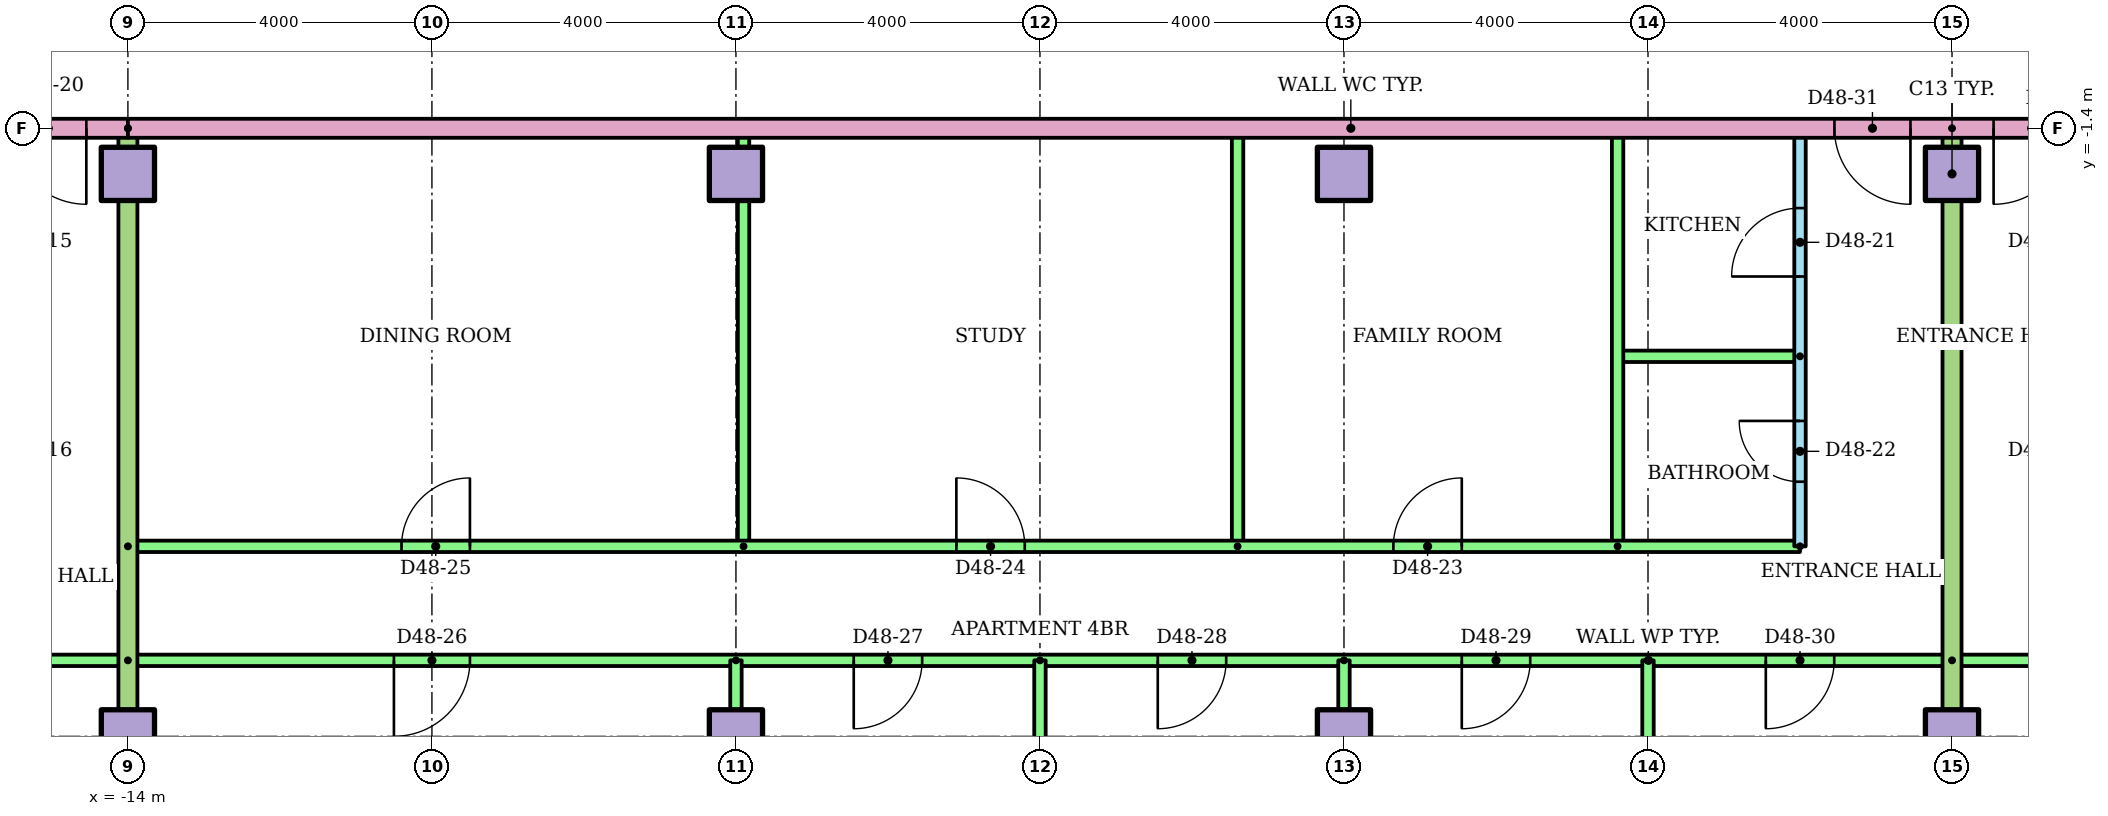
"""IFC4 building model, lengths in metres.
Left out: names, types, materials, properties, quantities, classifications, styles, units other than length and angle.
Written with IfcOpenShell. Run it as: python <this file> out.ifc"""

import sys

from ifc_helpers import new_model, si_unit, direction, frame, frame_2d, origin, origin_2d, place, context, subcontext, project, spatial, rectangle, extrude, element, fill, save


model = new_model("IFC4")
c1 = context("Model", 3, precision=1e-05, world=origin(), true_north=direction((0.0, 1.0)))
c2 = subcontext(c1, "Body", "Model", "MODEL_VIEW")
j1 = project(units=[si_unit("LENGTHUNIT", "METRE"), si_unit("PLANEANGLEUNIT", "RADIAN")], contexts=[c1])
p1 = place(None, origin())
s1 = spatial("IfcSite", under=j1, at=p1, CompositionType="ELEMENT")
p2 = place(p1, origin())
s2 = spatial("IfcBuilding", under=s1, at=p2, CompositionType="ELEMENT")
p3 = place(p2, frame((0.0, 0.0, 184.5)))
s3 = spatial("IfcBuildingStorey", under=s2, at=p3, CompositionType="ELEMENT", Elevation=184.5)
for number, where in (
    (1, (-14.0, -9.4, 0.0)),
    (2, (-6.0, -9.4, 0.0)),
    (3, (2.0, -9.4, 0.0)),
    (4, (10.0, -9.4, 0.0)),
    (5, (-14.0, -2.0, 0.0)),
    (6, (-6.0, -2.0, 0.0)),
    (7, (2.0, -2.0, 0.0)),
    (8, (10.0, -2.0, 0.0)),
):
    element("IfcColumn", number, at=place(p3, frame(where)), inside=s3, PredefinedType="COLUMN", context=c2, shape_type="SweptSolid", body=[
        extrude(rectangle(XDim=0.7, YDim=0.7, at=origin_2d()), origin(), (0.0, 0.0, 1.0), 3.2),
    ])
p4 = place(p3, frame((-14.0, -8.4, 0.0), z_axis=(0.0, 0.0, 1.0), x_axis=(-1.0, 0.0, 0.0)))
e9 = element("IfcWall", 9, at=p4, inside=s3, PredefinedType="PARTITIONING", context=c2, shape_type="SweptSolid", body=[
    extrude(rectangle(XDim=10.81, YDim=0.15, at=frame_2d((5.405, 0.0))), origin(), (0.0, 0.0, 1.0), 2.4),
])
p5 = place(p4, frame((8.547, 0.0, 0.0)))
e10 = element("IfcOpeningElement", 10, at=p5, cuts=e9, PredefinedType="OPENING", context=c2, shape_type="SweptSolid", body=[
    extrude(rectangle(XDim=1.0, YDim=2.1, at=frame_2d((0.5, 1.05))), frame((0.0, 0.085, 0.0), z_axis=(0.0, -1.0, 0.0), x_axis=(1.0, 0.0, 0.0)), (0.0, 0.0, 1.0), 0.17),
])
p6 = place(p4, frame((2.55, 0.0, 0.0)))
e11 = element("IfcOpeningElement", 11, at=p6, cuts=e9, PredefinedType="OPENING", context=c2, shape_type="SweptSolid", body=[
    extrude(rectangle(XDim=1.0, YDim=2.1, at=frame_2d((0.5, 1.05))), frame((0.0, 0.085, 0.0), z_axis=(0.0, -1.0, 0.0), x_axis=(1.0, 0.0, 0.0)), (0.0, 0.0, 1.0), 0.17),
])
p7 = place(p3, frame((8.0, -6.9, 0.0), z_axis=(0.0, 0.0, 1.0), x_axis=(0.0, 1.0, 0.0)))
e12 = element("IfcWall", 12, at=p7, inside=s3, PredefinedType="PARTITIONING", context=c2, shape_type="SweptSolid", body=[
    extrude(rectangle(XDim=5.5, YDim=0.15, at=frame_2d((2.75, 0.0))), origin(), (0.0, 0.0, 1.0), 2.4),
])
p8 = place(p7, frame((3.55, 0.0, 0.0)))
e13 = element("IfcOpeningElement", 13, at=p8, cuts=e12, PredefinedType="OPENING", context=c2, shape_type="SweptSolid", body=[
    extrude(rectangle(XDim=0.9, YDim=2.1, at=frame_2d((0.45, 1.05))), frame((0.0, 0.085, 0.0), z_axis=(0.0, -1.0, 0.0), x_axis=(1.0, 0.0, 0.0)), (0.0, 0.0, 1.0), 0.17),
])
p9 = place(p7, frame((0.85, 0.0, 0.0)))
e14 = element("IfcOpeningElement", 14, at=p9, cuts=e12, PredefinedType="OPENING", context=c2, shape_type="SweptSolid", body=[
    extrude(rectangle(XDim=0.8, YDim=2.1, at=frame_2d((0.4, 1.05))), frame((0.0, 0.085, 0.0), z_axis=(0.0, -1.0, 0.0), x_axis=(1.0, 0.0, 0.0)), (0.0, 0.0, 1.0), 0.17),
])
p10 = place(p3, frame((8.0, -4.4, 0.0), z_axis=(0.0, 0.0, 1.0), x_axis=(-1.0, 0.0, 0.0)))
e15 = element("IfcWall", 15, at=p10, inside=s3, PredefinedType="PARTITIONING", context=c2, shape_type="SweptSolid", body=[
    extrude(rectangle(XDim=2.4, YDim=0.15, at=frame_2d((1.2, 0.0))), origin(), (0.0, 0.0, 1.0), 2.4),
])
for number, where, z_axis, x_axis in (
    (16, (5.6, -6.9, 0.0), (0.0, 0.0, 1.0), (0.0, 1.0, 0.0)),
    (17, (0.6, -6.9, 0.0), (0.0, 0.0, 1.0), (0.0, 1.0, 0.0)),
    (18, (-5.9, -6.9, 0.0), (0.0, 0.0, 1.0), (0.0, 1.0, 0.0)),
):
    element("IfcWall", number, at=place(p3, frame(where, z_axis=z_axis, x_axis=x_axis)), inside=s3, PredefinedType="PARTITIONING", context=c2, shape_type="SweptSolid", body=[
        extrude(rectangle(XDim=5.5, YDim=0.15, at=frame_2d((2.75, 0.0))), origin(), (0.0, 0.0, 1.0), 2.4),
    ])
p11 = place(p3, frame((-14.0, -6.9, 0.0)))
e19 = element("IfcWall", 19, at=p11, inside=s3, PredefinedType="PARTITIONING", context=c2, shape_type="SweptSolid", body=[
    extrude(rectangle(XDim=22.0, YDim=0.15, at=frame_2d((11.0, 0.0))), origin(), (0.0, 0.0, 1.0), 2.4),
])
p12 = place(p11, frame((16.65, 0.0, 0.0)))
e20 = element("IfcOpeningElement", 20, at=p12, cuts=e19, PredefinedType="OPENING", context=c2, shape_type="SweptSolid", body=[
    extrude(rectangle(XDim=0.9, YDim=2.1, at=frame_2d((0.45, 1.05))), frame((0.0, 0.085, 0.0), z_axis=(0.0, -1.0, 0.0), x_axis=(1.0, 0.0, 0.0)), (0.0, 0.0, 1.0), 0.17),
])
p13 = place(p11, frame((10.9, 0.0, 0.0)))
e21 = element("IfcOpeningElement", 21, at=p13, cuts=e19, PredefinedType="OPENING", context=c2, shape_type="SweptSolid", body=[
    extrude(rectangle(XDim=0.9, YDim=2.1, at=frame_2d((0.45, 1.05))), frame((0.0, 0.085, 0.0), z_axis=(0.0, -1.0, 0.0), x_axis=(1.0, 0.0, 0.0)), (0.0, 0.0, 1.0), 0.17),
])
p14 = place(p11, frame((3.6, 0.0, 0.0)))
e22 = element("IfcOpeningElement", 22, at=p14, cuts=e19, PredefinedType="OPENING", context=c2, shape_type="SweptSolid", body=[
    extrude(rectangle(XDim=0.9, YDim=2.1, at=frame_2d((0.45, 1.05))), frame((0.0, 0.085, 0.0), z_axis=(0.0, -1.0, 0.0), x_axis=(1.0, 0.0, 0.0)), (0.0, 0.0, 1.0), 0.17),
])
p15 = place(p3, frame((10.0, -8.4, 0.0), z_axis=(0.0, 0.0, 1.0), x_axis=(-1.0, 0.0, 0.0)))
e23 = element("IfcWall", 23, at=p15, inside=s3, PredefinedType="PARTITIONING", context=c2, shape_type="SweptSolid", body=[
    extrude(rectangle(XDim=24.0, YDim=0.15, at=frame_2d((12.0, 0.0))), origin(), (0.0, 0.0, 1.0), 2.4),
])
p16 = place(p15, frame((19.5, 0.0, 0.0)))
e24 = element("IfcOpeningElement", 24, at=p16, cuts=e23, PredefinedType="OPENING", context=c2, shape_type="SweptSolid", body=[
    extrude(rectangle(XDim=1.0, YDim=2.1, at=frame_2d((0.5, 1.05))), frame((0.0, 0.085, 0.0), z_axis=(0.0, -1.0, 0.0), x_axis=(1.0, 0.0, 0.0)), (0.0, 0.0, 1.0), 0.17),
])
p17 = place(p15, frame((13.55, 0.0, 0.0)))
e25 = element("IfcOpeningElement", 25, at=p17, cuts=e23, PredefinedType="OPENING", context=c2, shape_type="SweptSolid", body=[
    extrude(rectangle(XDim=0.9, YDim=2.1, at=frame_2d((0.45, 1.05))), frame((0.0, 0.085, 0.0), z_axis=(0.0, -1.0, 0.0), x_axis=(1.0, 0.0, 0.0)), (0.0, 0.0, 1.0), 0.17),
])
p18 = place(p15, frame((9.55, 0.0, 0.0)))
e26 = element("IfcOpeningElement", 26, at=p18, cuts=e23, PredefinedType="OPENING", context=c2, shape_type="SweptSolid", body=[
    extrude(rectangle(XDim=0.9, YDim=2.1, at=frame_2d((0.45, 1.05))), frame((0.0, 0.085, 0.0), z_axis=(0.0, -1.0, 0.0), x_axis=(1.0, 0.0, 0.0)), (0.0, 0.0, 1.0), 0.17),
])
p19 = place(p15, frame((5.55, 0.0, 0.0)))
e27 = element("IfcOpeningElement", 27, at=p19, cuts=e23, PredefinedType="OPENING", context=c2, shape_type="SweptSolid", body=[
    extrude(rectangle(XDim=0.9, YDim=2.1, at=frame_2d((0.45, 1.05))), frame((0.0, 0.085, 0.0), z_axis=(0.0, -1.0, 0.0), x_axis=(1.0, 0.0, 0.0)), (0.0, 0.0, 1.0), 0.17),
])
p20 = place(p15, frame((1.55, 0.0, 0.0)))
e28 = element("IfcOpeningElement", 28, at=p20, cuts=e23, PredefinedType="OPENING", context=c2, shape_type="SweptSolid", body=[
    extrude(rectangle(XDim=0.9, YDim=2.1, at=frame_2d((0.45, 1.05))), frame((0.0, 0.085, 0.0), z_axis=(0.0, -1.0, 0.0), x_axis=(1.0, 0.0, 0.0)), (0.0, 0.0, 1.0), 0.17),
])
p21 = place(p3, frame((-6.0, -8.4, 0.0), z_axis=(0.0, 0.0, 1.0), x_axis=(0.0, -1.0, 0.0)))
e29 = element("IfcWall", 29, at=p21, inside=s3, PredefinedType="PARTITIONING", context=c2, shape_type="SweptSolid", body=[
    extrude(rectangle(XDim=8.01, YDim=0.15, at=frame_2d((4.005, 0.0))), origin(), (0.0, 0.0, 1.0), 2.4),
])
p22 = place(p3, frame((-2.0, -8.4, 0.0), z_axis=(0.0, 0.0, 1.0), x_axis=(0.0, -1.0, 0.0)))
e30 = element("IfcWall", 30, at=p22, inside=s3, PredefinedType="PARTITIONING", context=c2, shape_type="SweptSolid", body=[
    extrude(rectangle(XDim=8.021, YDim=0.15, at=frame_2d((4.01, 0.0))), origin(), (0.0, 0.0, 1.0), 2.4),
])
p23 = place(p3, frame((2.0, -8.4, 0.0), z_axis=(0.0, 0.0, 1.0), x_axis=(0.0, -1.0, 0.0)))
e31 = element("IfcWall", 31, at=p23, inside=s3, PredefinedType="PARTITIONING", context=c2, shape_type="SweptSolid", body=[
    extrude(rectangle(XDim=8.01, YDim=0.15, at=frame_2d((4.005, 0.0))), origin(), (0.0, 0.0, 1.0), 2.4),
])
p24 = place(p3, frame((6.0, -8.4, 0.0), z_axis=(0.0, 0.0, 1.0), x_axis=(0.0, -1.0, 0.0)))
e32 = element("IfcWall", 32, at=p24, inside=s3, PredefinedType="PARTITIONING", context=c2, shape_type="SweptSolid", body=[
    extrude(rectangle(XDim=8.021, YDim=0.15, at=frame_2d((4.01, 0.0))), origin(), (0.0, 0.0, 1.0), 2.4),
])
p25 = place(p3, frame((-14.0, -1.4, 0.0), z_axis=(0.0, 0.0, 1.0), x_axis=(0.0, -1.0, 0.0)))
e33 = element("IfcWall", 33, at=p25, inside=s3, PredefinedType="PARTITIONING", context=c2, shape_type="SweptSolid", body=[
    extrude(rectangle(XDim=15.01, YDim=0.25, at=frame_2d((7.505, 0.0))), origin(), (0.0, 0.0, 1.0), 2.4),
])
p26 = place(p3, frame((18.0, -8.4, 0.0), z_axis=(0.0, 0.0, 1.0), x_axis=(-1.0, 0.0, 0.0)))
e34 = element("IfcWall", 34, at=p26, inside=s3, PredefinedType="PARTITIONING", context=c2, shape_type="SweptSolid", body=[
    extrude(rectangle(XDim=8.0, YDim=0.15, at=frame_2d((4.0, 0.0))), origin(), (0.0, 0.0, 1.0), 2.4),
])
p27 = place(p26, frame((5.55, 0.0, 0.0)))
e35 = element("IfcOpeningElement", 35, at=p27, cuts=e34, PredefinedType="OPENING", context=c2, shape_type="SweptSolid", body=[
    extrude(rectangle(XDim=0.9, YDim=2.1, at=frame_2d((0.45, 1.05))), frame((0.0, 0.085, 0.0), z_axis=(0.0, -1.0, 0.0), x_axis=(1.0, 0.0, 0.0)), (0.0, 0.0, 1.0), 0.17),
])
p28 = place(p26, frame((1.5, 0.0, 0.0)))
e36 = element("IfcOpeningElement", 36, at=p28, cuts=e34, PredefinedType="OPENING", context=c2, shape_type="SweptSolid", body=[
    extrude(rectangle(XDim=1.0, YDim=2.1, at=frame_2d((0.5, 1.05))), frame((0.0, 0.085, 0.0), z_axis=(0.0, -1.0, 0.0), x_axis=(1.0, 0.0, 0.0)), (0.0, 0.0, 1.0), 0.17),
])
p29 = place(p3, frame((10.0, -1.4, 0.0), z_axis=(0.0, 0.0, 1.0), x_axis=(0.0, -1.0, 0.0)))
e37 = element("IfcWall", 37, at=p29, inside=s3, PredefinedType="PARTITIONING", context=c2, shape_type="SweptSolid", body=[
    extrude(rectangle(XDim=15.01, YDim=0.25, at=frame_2d((7.505, 0.0))), origin(), (0.0, 0.0, 1.0), 2.4),
])
p30 = place(p3, frame((-14.0, -1.4, 0.0), z_axis=(0.0, 0.0, 1.0), x_axis=(-1.0, 0.0, 0.0)))
e38 = element("IfcWall", 38, at=p30, inside=s3, PredefinedType="PARTITIONING", context=c2, shape_type="SweptSolid", body=[
    extrude(rectangle(XDim=10.82, YDim=0.25, at=frame_2d((5.41, 0.0))), origin(), (0.0, 0.0, 1.0), 2.4),
])
p31 = place(p30, frame((0.547, 0.0, 0.0)))
e39 = element("IfcOpeningElement", 39, at=p31, cuts=e38, PredefinedType="OPENING", context=c2, shape_type="SweptSolid", body=[
    extrude(rectangle(XDim=1.0, YDim=2.1, at=frame_2d((0.5, 1.05))), frame((0.0, 0.135, 0.0), z_axis=(0.0, -1.0, 0.0), x_axis=(1.0, 0.0, 0.0)), (0.0, 0.0, 1.0), 0.27),
])
p32 = place(p3, frame((14.0, -1.4, 0.0), z_axis=(0.0, 0.0, 1.0), x_axis=(-1.0, 0.0, 0.0)))
e40 = element("IfcWall", 40, at=p32, inside=s3, PredefinedType="PARTITIONING", context=c2, shape_type="SweptSolid", body=[
    extrude(rectangle(XDim=28.0, YDim=0.25, at=frame_2d((14.0, 0.0))), origin(), (0.0, 0.0, 1.0), 2.4),
])
p33 = place(p32, frame((4.547, 0.0, 0.0)))
e41 = element("IfcOpeningElement", 41, at=p33, cuts=e40, PredefinedType="OPENING", context=c2, shape_type="SweptSolid", body=[
    extrude(rectangle(XDim=1.0, YDim=2.1, at=frame_2d((0.5, 1.05))), frame((0.0, 0.135, 0.0), z_axis=(0.0, -1.0, 0.0), x_axis=(1.0, 0.0, 0.0)), (0.0, 0.0, 1.0), 0.27),
])
p34 = place(p32, frame((2.453, 0.0, 0.0)))
e42 = element("IfcOpeningElement", 42, at=p34, cuts=e40, PredefinedType="OPENING", context=c2, shape_type="SweptSolid", body=[
    extrude(rectangle(XDim=1.0, YDim=2.1, at=frame_2d((0.5, 1.05))), frame((0.0, 0.135, 0.0), z_axis=(0.0, -1.0, 0.0), x_axis=(1.0, 0.0, 0.0)), (0.0, 0.0, 1.0), 0.27),
])
p35 = place(p31, origin())
e43 = element("IfcDoor", 43, at=p35, inside=s3, OperationType="SINGLE_SWING_LEFT", PredefinedType="DOOR", context=c2, shape_type="SweptSolid", body=[
    extrude(rectangle(XDim=1.0, YDim=2.1, at=frame_2d((0.5, 1.05))), frame((0.0, 0.025, 0.0), z_axis=(0.0, -1.0, 0.0), x_axis=(1.0, 0.0, 0.0)), (0.0, 0.0, 1.0), 0.05),
])
fill(e39, e43)
p36 = place(p8, origin())
e44 = element("IfcDoor", 44, at=p36, inside=s3, OperationType="SINGLE_SWING_LEFT", PredefinedType="DOOR", context=c2, shape_type="SweptSolid", body=[
    extrude(rectangle(XDim=0.9, YDim=2.1, at=frame_2d((0.45, 1.05))), frame((0.0, 0.025, 0.0), z_axis=(0.0, -1.0, 0.0), x_axis=(1.0, 0.0, 0.0)), (0.0, 0.0, 1.0), 0.05),
])
fill(e13, e44)
p37 = place(p9, origin())
e45 = element("IfcDoor", 45, at=p37, inside=s3, OperationType="SINGLE_SWING_RIGHT", PredefinedType="DOOR", context=c2, shape_type="SweptSolid", body=[
    extrude(rectangle(XDim=0.8, YDim=2.1, at=frame_2d((0.4, 1.05))), frame((0.0, 0.025, 0.0), z_axis=(0.0, -1.0, 0.0), x_axis=(1.0, 0.0, 0.0)), (0.0, 0.0, 1.0), 0.05),
])
fill(e14, e45)
p38 = place(p12, origin())
e46 = element("IfcDoor", 46, at=p38, inside=s3, OperationType="SINGLE_SWING_RIGHT", PredefinedType="DOOR", context=c2, shape_type="SweptSolid", body=[
    extrude(rectangle(XDim=0.9, YDim=2.1, at=frame_2d((0.45, 1.05))), frame((0.0, 0.025, 0.0), z_axis=(0.0, -1.0, 0.0), x_axis=(1.0, 0.0, 0.0)), (0.0, 0.0, 1.0), 0.05),
])
fill(e20, e46)
p39 = place(p13, origin())
e47 = element("IfcDoor", 47, at=p39, inside=s3, OperationType="SINGLE_SWING_LEFT", PredefinedType="DOOR", context=c2, shape_type="SweptSolid", body=[
    extrude(rectangle(XDim=0.9, YDim=2.1, at=frame_2d((0.45, 1.05))), frame((0.0, 0.025, 0.0), z_axis=(0.0, -1.0, 0.0), x_axis=(1.0, 0.0, 0.0)), (0.0, 0.0, 1.0), 0.05),
])
fill(e21, e47)
p40 = place(p14, origin())
e48 = element("IfcDoor", 48, at=p40, inside=s3, OperationType="SINGLE_SWING_RIGHT", PredefinedType="DOOR", context=c2, shape_type="SweptSolid", body=[
    extrude(rectangle(XDim=0.9, YDim=2.1, at=frame_2d((0.45, 1.05))), frame((0.0, 0.025, 0.0), z_axis=(0.0, -1.0, 0.0), x_axis=(1.0, 0.0, 0.0)), (0.0, 0.0, 1.0), 0.05),
])
fill(e22, e48)
p41 = place(p16, origin())
e49 = element("IfcDoor", 49, at=p41, inside=s3, OperationType="SINGLE_SWING_RIGHT", PredefinedType="DOOR", context=c2, shape_type="SweptSolid", body=[
    extrude(rectangle(XDim=1.0, YDim=2.1, at=frame_2d((0.5, 1.05))), frame((0.0, 0.025, 0.0), z_axis=(0.0, -1.0, 0.0), x_axis=(1.0, 0.0, 0.0)), (0.0, 0.0, 1.0), 0.05),
])
fill(e24, e49)
p42 = place(p17, origin())
e50 = element("IfcDoor", 50, at=p42, inside=s3, OperationType="SINGLE_SWING_RIGHT", PredefinedType="DOOR", context=c2, shape_type="SweptSolid", body=[
    extrude(rectangle(XDim=0.9, YDim=2.1, at=frame_2d((0.45, 1.05))), frame((0.0, 0.025, 0.0), z_axis=(0.0, -1.0, 0.0), x_axis=(1.0, 0.0, 0.0)), (0.0, 0.0, 1.0), 0.05),
])
fill(e25, e50)
p43 = place(p18, origin())
e51 = element("IfcDoor", 51, at=p43, inside=s3, OperationType="SINGLE_SWING_RIGHT", PredefinedType="DOOR", context=c2, shape_type="SweptSolid", body=[
    extrude(rectangle(XDim=0.9, YDim=2.1, at=frame_2d((0.45, 1.05))), frame((0.0, 0.025, 0.0), z_axis=(0.0, -1.0, 0.0), x_axis=(1.0, 0.0, 0.0)), (0.0, 0.0, 1.0), 0.05),
])
fill(e26, e51)
p44 = place(p19, origin())
e52 = element("IfcDoor", 52, at=p44, inside=s3, OperationType="SINGLE_SWING_RIGHT", PredefinedType="DOOR", context=c2, shape_type="SweptSolid", body=[
    extrude(rectangle(XDim=0.9, YDim=2.1, at=frame_2d((0.45, 1.05))), frame((0.0, 0.025, 0.0), z_axis=(0.0, -1.0, 0.0), x_axis=(1.0, 0.0, 0.0)), (0.0, 0.0, 1.0), 0.05),
])
fill(e27, e52)
p45 = place(p20, origin())
e53 = element("IfcDoor", 53, at=p45, inside=s3, OperationType="SINGLE_SWING_RIGHT", PredefinedType="DOOR", context=c2, shape_type="SweptSolid", body=[
    extrude(rectangle(XDim=0.9, YDim=2.1, at=frame_2d((0.45, 1.05))), frame((0.0, 0.025, 0.0), z_axis=(0.0, -1.0, 0.0), x_axis=(1.0, 0.0, 0.0)), (0.0, 0.0, 1.0), 0.05),
])
fill(e28, e53)
p46 = place(p33, origin())
e54 = element("IfcDoor", 54, at=p46, inside=s3, OperationType="SINGLE_SWING_LEFT", PredefinedType="DOOR", context=c2, shape_type="SweptSolid", body=[
    extrude(rectangle(XDim=1.0, YDim=2.1, at=frame_2d((0.5, 1.05))), frame((0.0, 0.025, 0.0), z_axis=(0.0, -1.0, 0.0), x_axis=(1.0, 0.0, 0.0)), (0.0, 0.0, 1.0), 0.05),
])
fill(e41, e54)
p47 = place(p34, origin())
e55 = element("IfcDoor", 55, at=p47, inside=s3, OperationType="SINGLE_SWING_RIGHT", PredefinedType="DOOR", context=c2, shape_type="SweptSolid", body=[
    extrude(rectangle(XDim=1.0, YDim=2.1, at=frame_2d((0.5, 1.05))), frame((0.0, 0.025, 0.0), z_axis=(0.0, -1.0, 0.0), x_axis=(1.0, 0.0, 0.0)), (0.0, 0.0, 1.0), 0.05),
])
fill(e42, e55)
save(model, sys.argv[1])
